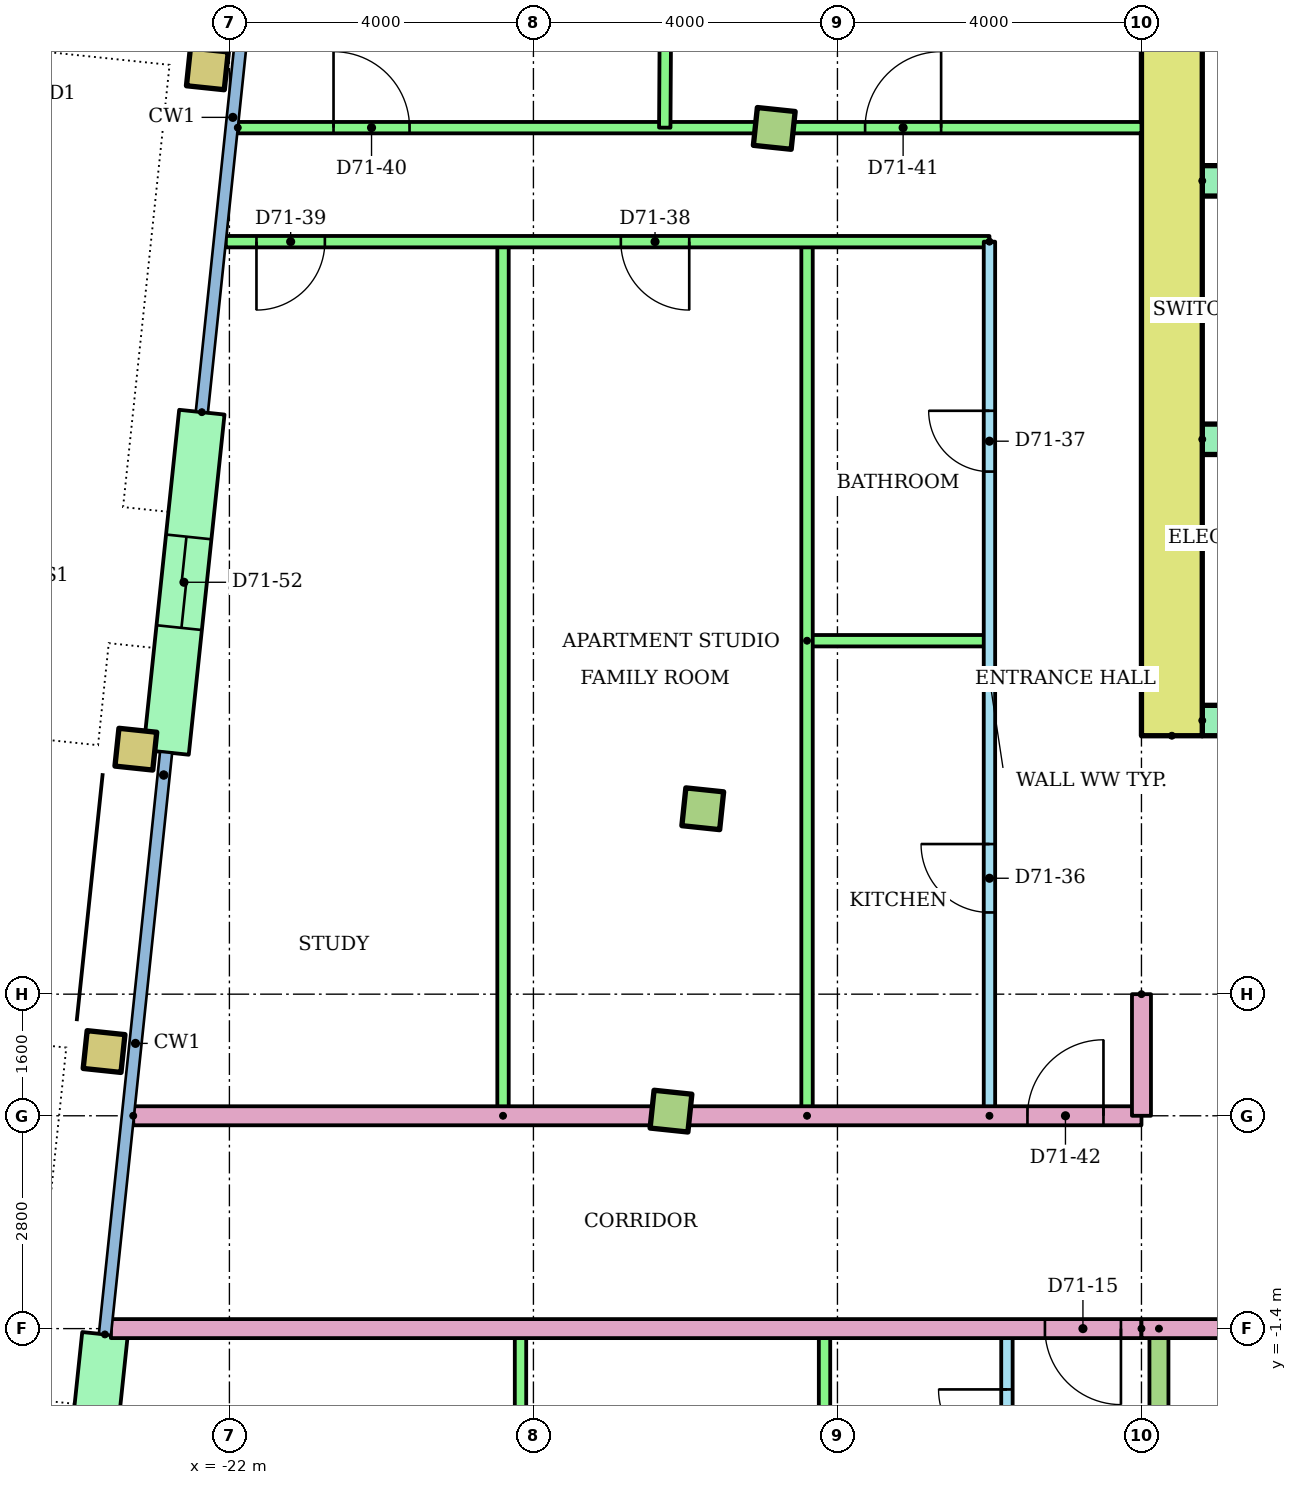
"""IFC4 building model, lengths in metres.
Left out: names, types, materials, properties, quantities, classifications, styles, units other than length and angle.
Written with IfcOpenShell. Run it as: python <this file> out.ifc"""

import sys

from ifc_helpers import new_model, si_unit, direction, frame, frame_2d, origin, origin_2d, place, context, subcontext, project, spatial, rectangle, hollow_rectangle, extrude, element, fill, save


model = new_model("IFC4")
c1 = context("Model", 3, precision=1e-05, world=origin(), true_north=direction((0.0, 1.0)))
c2 = subcontext(c1, "Body", "Model", "MODEL_VIEW")
j1 = project(units=[si_unit("LENGTHUNIT", "METRE"), si_unit("PLANEANGLEUNIT", "RADIAN")], contexts=[c1])
p1 = place(None, origin())
s1 = spatial("IfcSite", under=j1, at=p1, CompositionType="ELEMENT")
p2 = place(p1, origin())
s2 = spatial("IfcBuilding", under=s1, at=p2, CompositionType="ELEMENT")
p3 = place(p2, frame((0.0, 0.0, 272.3)))
s3 = spatial("IfcBuildingStorey", under=s2, at=p3, CompositionType="ELEMENT", Elevation=272.3)
p4 = place(p3, frame((-23.649, 2.245, 0.0), z_axis=(0.0, 0.0, 1.0), x_axis=(0.994521895368, -0.104528463268, 0.0)))
e1 = element("IfcColumn", 1, at=p4, inside=s3, PredefinedType="COLUMN", context=c2, shape_type="SweptSolid", body=[
    extrude(hollow_rectangle(XDim=0.5, YDim=0.5, WallThickness=0.025, at=origin_2d()), origin(), (0.0, 0.0, 1.0), 3.2),
])
p5 = place(p3, frame((-16.19, 1.461, 0.0), z_axis=(0.0, 0.0, 1.0), x_axis=(0.994521895368, -0.104528463268, 0.0)))
e2 = element("IfcColumn", 2, at=p5, inside=s3, PredefinedType="COLUMN", context=c2, shape_type="SweptSolid", body=[
    extrude(rectangle(XDim=0.5, YDim=0.5, at=origin_2d()), origin(), (0.0, 0.0, 1.0), 3.2),
])
p6 = place(p3, frame((-23.231, 6.223, 0.0), z_axis=(0.0, 0.0, 1.0), x_axis=(0.994521895368, -0.104528463268, 0.0)))
e3 = element("IfcColumn", 3, at=p6, inside=s3, PredefinedType="COLUMN", context=c2, shape_type="SweptSolid", body=[
    extrude(hollow_rectangle(XDim=0.5, YDim=0.5, WallThickness=0.025, at=origin_2d()), origin(), (0.0, 0.0, 1.0), 3.2),
])
p7 = place(p3, frame((-15.772, 5.439, 0.0), z_axis=(0.0, 0.0, 1.0), x_axis=(0.994521895368, -0.104528463268, 0.0)))
e4 = element("IfcColumn", 4, at=p7, inside=s3, PredefinedType="COLUMN", context=c2, shape_type="SweptSolid", body=[
    extrude(rectangle(XDim=0.5, YDim=0.5, at=origin_2d()), origin(), (0.0, 0.0, 1.0), 3.2),
])
p8 = place(p3, frame((-22.29, 15.174, 0.0), z_axis=(0.0, 0.0, 1.0), x_axis=(0.994521895368, -0.104528463268, 0.0)))
e5 = element("IfcColumn", 5, at=p8, inside=s3, PredefinedType="COLUMN", context=c2, shape_type="SweptSolid", body=[
    extrude(hollow_rectangle(XDim=0.5, YDim=0.5, WallThickness=0.025, at=origin_2d()), origin(), (0.0, 0.0, 1.0), 3.2),
])
p9 = place(p3, frame((-14.831, 14.39, 0.0), z_axis=(0.0, 0.0, 1.0), x_axis=(0.994521895368, -0.104528463268, 0.0)))
e6 = element("IfcColumn", 6, at=p9, inside=s3, PredefinedType="COLUMN", context=c2, shape_type="SweptSolid", body=[
    extrude(rectangle(XDim=0.5, YDim=0.5, at=origin_2d()), origin(), (0.0, 0.0, 1.0), 3.2),
])
p10 = place(p3, frame((-22.363, 10.657, 0.0), z_axis=(0.0, 0.0, 1.0), x_axis=(-0.104492739125, -0.994525649478, 0.0)))
e7 = element("IfcWall", 7, at=p10, inside=s3, PredefinedType="STANDARD", context=c2, shape_type="SweptSolid", body=[
    extrude(rectangle(XDim=4.5, YDim=0.6, at=frame_2d((2.25, 0.0))), origin(), (0.0, 0.0, 1.0), 2.92),
])
p11 = place(p10, frame((1.65, 0.0, 0.0)))
e8 = element("IfcOpeningElement", 8, at=p11, cuts=e7, PredefinedType="OPENING", context=c2, shape_type="SweptSolid", body=[
    extrude(rectangle(XDim=1.2, YDim=2.1, at=frame_2d((0.6, 1.05))), frame((0.0, 0.31, 0.0), z_axis=(0.0, -1.0, 0.0), x_axis=(1.0, 0.0, 0.0)), (0.0, 0.0, 1.0), 0.62),
])
p12 = place(p3, frame((-23.638, -1.476, 0.0), z_axis=(0.0, 0.0, 1.0), x_axis=(-0.104513052986, -0.994523514933, 0.0)))
e9 = element("IfcWall", 9, at=p12, inside=s3, PredefinedType="STANDARD", context=c2, shape_type="SweptSolid", body=[
    extrude(rectangle(XDim=3.7, YDim=0.6, at=frame_2d((1.85, 0.0))), origin(), (0.0, 0.0, 1.0), 2.92),
])
p13 = place(p12, frame((1.25, 0.0, 0.0)))
e10 = element("IfcOpeningElement", 10, at=p13, cuts=e9, PredefinedType="OPENING", context=c2, shape_type="SweptSolid", body=[
    extrude(rectangle(XDim=1.2, YDim=2.1, at=frame_2d((0.6, 1.05))), frame((0.0, 0.31, 0.0), z_axis=(0.0, -1.0, 0.0), x_axis=(1.0, 0.0, 0.0)), (0.0, 0.0, 1.0), 0.62),
])
p14 = place(p3, frame((-9.6, 6.4, 0.0), z_axis=(0.0, 0.0, 1.0), x_axis=(0.0, 1.0, 0.0)))
e11 = element("IfcWall", 11, at=p14, inside=s3, PredefinedType="SHEAR", context=c2, shape_type="SweptSolid", body=[
    extrude(rectangle(XDim=13.6, YDim=0.8, at=frame_2d((6.8, 0.0))), origin(), (0.0, 0.0, 1.0), 2.92),
])
p15 = place(p3, frame((-9.2, 6.6, 0.0)))
e12 = element("IfcWall", 12, at=p15, inside=s3, PredefinedType="SHEAR", context=c2, shape_type="SweptSolid", body=[
    extrude(rectangle(XDim=18.4, YDim=0.4, at=frame_2d((9.2, 0.0))), origin(), (0.0, 0.0, 1.0), 2.92),
])
p16 = place(p15, frame((8.3, 0.0, 0.0)))
e13 = element("IfcOpeningElement", 13, at=p16, cuts=e12, PredefinedType="OPENING", context=c2, shape_type="SweptSolid", body=[
    extrude(rectangle(XDim=1.8, YDim=2.1, at=frame_2d((0.9, 1.05))), frame((0.0, 0.21, 0.0), z_axis=(0.0, -1.0, 0.0), x_axis=(1.0, 0.0, 0.0)), (0.0, 0.0, 1.0), 0.42),
])
p17 = place(p15, frame((3.8, 0.0, 0.0)))
e14 = element("IfcOpeningElement", 14, at=p17, cuts=e12, PredefinedType="OPENING", context=c2, shape_type="SweptSolid", body=[
    extrude(rectangle(XDim=1.8, YDim=2.1, at=frame_2d((0.9, 1.05))), frame((0.0, 0.21, 0.0), z_axis=(0.0, -1.0, 0.0), x_axis=(1.0, 0.0, 0.0)), (0.0, 0.0, 1.0), 0.42),
])
p18 = place(p15, frame((12.8, 0.0, 0.0)))
e15 = element("IfcOpeningElement", 15, at=p18, cuts=e12, PredefinedType="OPENING", context=c2, shape_type="SweptSolid", body=[
    extrude(rectangle(XDim=1.8, YDim=2.1, at=frame_2d((0.9, 1.05))), frame((0.0, 0.21, 0.0), z_axis=(0.0, -1.0, 0.0), x_axis=(1.0, 0.0, 0.0)), (0.0, 0.0, 1.0), 0.42),
])
p19 = place(p3, frame((-9.2, 10.3, 0.0)))
e16 = element("IfcWall", 16, at=p19, inside=s3, PredefinedType="SHEAR", context=c2, shape_type="SweptSolid", body=[
    extrude(rectangle(XDim=8.0, YDim=0.4, at=frame_2d((4.0, 0.0))), origin(), (0.0, 0.0, 1.0), 2.92),
])
p20 = place(p19, frame((3.35, 0.0, 0.0)))
e17 = element("IfcOpeningElement", 17, at=p20, cuts=e16, PredefinedType="OPENING", context=c2, shape_type="SweptSolid", body=[
    extrude(rectangle(XDim=1.1, YDim=2.1, at=frame_2d((0.55, 1.05))), frame((0.0, 0.21, 0.0), z_axis=(0.0, -1.0, 0.0), x_axis=(1.0, 0.0, 0.0)), (0.0, 0.0, 1.0), 0.42),
])
p21 = place(p19, frame((6.083, 0.0, 0.0)))
e18 = element("IfcOpeningElement", 18, at=p21, cuts=e16, PredefinedType="OPENING", context=c2, shape_type="SweptSolid", body=[
    extrude(rectangle(XDim=1.1, YDim=2.1, at=frame_2d((0.55, 1.05))), frame((0.0, 0.21, 0.0), z_axis=(0.0, -1.0, 0.0), x_axis=(1.0, 0.0, 0.0)), (0.0, 0.0, 1.0), 0.42),
])
p22 = place(p19, frame((0.917, 0.0, 0.0)))
e19 = element("IfcOpeningElement", 19, at=p22, cuts=e16, PredefinedType="OPENING", context=c2, shape_type="SweptSolid", body=[
    extrude(rectangle(XDim=1.0, YDim=2.1, at=frame_2d((0.5, 1.05))), frame((0.0, 0.21, 0.0), z_axis=(0.0, -1.0, 0.0), x_axis=(1.0, 0.0, 0.0)), (0.0, 0.0, 1.0), 0.42),
])
p23 = place(p3, frame((-9.2, 13.7, 0.0)))
e20 = element("IfcWall", 20, at=p23, inside=s3, PredefinedType="SHEAR", context=c2, shape_type="SweptSolid", body=[
    extrude(rectangle(XDim=8.0, YDim=0.4, at=frame_2d((4.0, 0.0))), origin(), (0.0, 0.0, 1.0), 2.92),
])
p24 = place(p3, frame((-11.77, -5.9, 0.0), z_axis=(0.0, 0.0, 1.0), x_axis=(0.0, 1.0, 0.0)))
e21 = element("IfcWall", 21, at=p24, inside=s3, PredefinedType="PARTITIONING", context=c2, shape_type="SweptSolid", body=[
    extrude(rectangle(XDim=4.5, YDim=0.15, at=frame_2d((2.25, 0.0))), origin(), (0.0, 0.0, 1.0), 2.4),
])
p25 = place(p24, frame((2.8, 0.0, 0.0)))
e22 = element("IfcOpeningElement", 22, at=p25, cuts=e21, PredefinedType="OPENING", context=c2, shape_type="SweptSolid", body=[
    extrude(rectangle(XDim=0.9, YDim=2.1, at=frame_2d((0.45, 1.05))), frame((0.0, 0.085, 0.0), z_axis=(0.0, -1.0, 0.0), x_axis=(1.0, 0.0, 0.0)), (0.0, 0.0, 1.0), 0.17),
])
p26 = place(p24, frame((0.6, 0.0, 0.0)))
e23 = element("IfcOpeningElement", 23, at=p26, cuts=e21, PredefinedType="OPENING", context=c2, shape_type="SweptSolid", body=[
    extrude(rectangle(XDim=0.8, YDim=2.1, at=frame_2d((0.4, 1.05))), frame((0.0, 0.085, 0.0), z_axis=(0.0, -1.0, 0.0), x_axis=(1.0, 0.0, 0.0)), (0.0, 0.0, 1.0), 0.17),
])
for number, where, z_axis, x_axis in (
    (24, (-14.17, -5.9, 0.0), (0.0, 0.0, 1.0), (0.0, 1.0, 0.0)),
    (25, (-18.17, -5.9, 0.0), (0.0, 0.0, 1.0), (0.0, 1.0, 0.0)),
):
    element("IfcWall", number, at=place(p3, frame(where, z_axis=z_axis, x_axis=x_axis)), inside=s3, PredefinedType="PARTITIONING", context=c2, shape_type="SweptSolid", body=[
        extrude(rectangle(XDim=4.5, YDim=0.15, at=frame_2d((2.25, 0.0))), origin(), (0.0, 0.0, 1.0), 2.4),
    ])
p27 = place(p3, frame((-9.77, -1.4, 0.0), z_axis=(0.0, 0.0, 1.0), x_axis=(0.0, -1.0, 0.0)))
e26 = element("IfcWall", 26, at=p27, inside=s3, PredefinedType="PARTITIONING", context=c2, shape_type="SweptSolid", body=[
    extrude(rectangle(XDim=12.504, YDim=0.25, at=frame_2d((6.252, 0.0))), origin(), (0.0, 0.0, 1.0), 2.4),
])
p28 = place(p3, frame((-10.0, -1.4, 0.0), z_axis=(0.0, 0.0, 1.0), x_axis=(-1.0, 0.0, 0.0)))
e27 = element("IfcWall", 27, at=p28, inside=s3, PredefinedType="PARTITIONING", context=c2, shape_type="SweptSolid", body=[
    extrude(rectangle(XDim=13.56, YDim=0.25, at=frame_2d((6.78, 0.0))), origin(), (0.0, 0.0, 1.0), 2.4),
])
p29 = place(p28, frame((0.27, 0.0, 0.0)))
e28 = element("IfcOpeningElement", 28, at=p29, cuts=e27, PredefinedType="OPENING", context=c2, shape_type="SweptSolid", body=[
    extrude(rectangle(XDim=1.0, YDim=2.1, at=frame_2d((0.5, 1.05))), frame((0.0, 0.135, 0.0), z_axis=(0.0, -1.0, 0.0), x_axis=(1.0, 0.0, 0.0)), (0.0, 0.0, 1.0), 0.27),
])
p30 = place(p3, frame((-12.0, 1.4, 0.0), z_axis=(0.0, 0.0, 1.0), x_axis=(0.0, 1.0, 0.0)))
e29 = element("IfcWall", 29, at=p30, inside=s3, PredefinedType="PARTITIONING", context=c2, shape_type="SweptSolid", body=[
    extrude(rectangle(XDim=11.5, YDim=0.15, at=frame_2d((5.75, 0.0))), origin(), (0.0, 0.0, 1.0), 2.4),
])
p31 = place(p30, frame((2.675, 0.0, 0.0)))
e30 = element("IfcOpeningElement", 30, at=p31, cuts=e29, PredefinedType="OPENING", context=c2, shape_type="SweptSolid", body=[
    extrude(rectangle(XDim=0.9, YDim=2.1, at=frame_2d((0.45, 1.05))), frame((0.0, 0.085, 0.0), z_axis=(0.0, -1.0, 0.0), x_axis=(1.0, 0.0, 0.0)), (0.0, 0.0, 1.0), 0.17),
])
p32 = place(p30, frame((8.475, 0.0, 0.0)))
e31 = element("IfcOpeningElement", 31, at=p32, cuts=e29, PredefinedType="OPENING", context=c2, shape_type="SweptSolid", body=[
    extrude(rectangle(XDim=0.8, YDim=2.1, at=frame_2d((0.4, 1.05))), frame((0.0, 0.085, 0.0), z_axis=(0.0, -1.0, 0.0), x_axis=(1.0, 0.0, 0.0)), (0.0, 0.0, 1.0), 0.17),
])
p33 = place(p3, frame((-14.4, 7.65, 0.0)))
e32 = element("IfcWall", 32, at=p33, inside=s3, PredefinedType="PARTITIONING", context=c2, shape_type="SweptSolid", body=[
    extrude(rectangle(XDim=2.4, YDim=0.15, at=frame_2d((1.2, 0.0))), origin(), (0.0, 0.0, 1.0), 2.4),
])
for number, where, z_axis, x_axis in (
    (33, (-14.4, 1.4, 0.0), (0.0, 0.0, 1.0), (0.0, 1.0, 0.0)),
    (34, (-18.4, 1.4, 0.0), (0.0, 0.0, 1.0), (0.0, 1.0, 0.0)),
):
    element("IfcWall", number, at=place(p3, frame(where, z_axis=z_axis, x_axis=x_axis)), inside=s3, PredefinedType="PARTITIONING", context=c2, shape_type="SweptSolid", body=[
        extrude(rectangle(XDim=11.5, YDim=0.15, at=frame_2d((5.75, 0.0))), origin(), (0.0, 0.0, 1.0), 2.4),
    ])
p34 = place(p3, frame((-12.0, 12.9, 0.0), z_axis=(0.0, 0.0, 1.0), x_axis=(-1.0, 0.0, 0.0)))
e35 = element("IfcWall", 35, at=p34, inside=s3, PredefinedType="PARTITIONING", context=c2, shape_type="SweptSolid", body=[
    extrude(rectangle(XDim=10.047, YDim=0.15, at=frame_2d((5.024, 0.0))), origin(), (0.0, 0.0, 1.0), 2.4),
])
p35 = place(p34, frame((3.95, 0.0, 0.0)))
e36 = element("IfcOpeningElement", 36, at=p35, cuts=e35, PredefinedType="OPENING", context=c2, shape_type="SweptSolid", body=[
    extrude(rectangle(XDim=0.9, YDim=2.1, at=frame_2d((0.45, 1.05))), frame((0.0, 0.085, 0.0), z_axis=(0.0, -1.0, 0.0), x_axis=(1.0, 0.0, 0.0)), (0.0, 0.0, 1.0), 0.17),
])
p36 = place(p34, frame((8.744, 0.0, 0.0)))
e37 = element("IfcOpeningElement", 37, at=p36, cuts=e35, PredefinedType="OPENING", context=c2, shape_type="SweptSolid", body=[
    extrude(rectangle(XDim=0.9, YDim=2.1, at=frame_2d((0.45, 1.05))), frame((0.0, 0.085, 0.0), z_axis=(0.0, -1.0, 0.0), x_axis=(1.0, 0.0, 0.0)), (0.0, 0.0, 1.0), 0.17),
])
p37 = place(p3, frame((-21.89, 14.4, 0.0)))
e38 = element("IfcWall", 38, at=p37, inside=s3, PredefinedType="PARTITIONING", context=c2, shape_type="SweptSolid", body=[
    extrude(rectangle(XDim=11.89, YDim=0.15, at=frame_2d((5.945, 0.0))), origin(), (0.0, 0.0, 1.0), 2.4),
])
p38 = place(p37, frame((1.26, 0.0, 0.0)))
e39 = element("IfcOpeningElement", 39, at=p38, cuts=e38, PredefinedType="OPENING", context=c2, shape_type="SweptSolid", body=[
    extrude(rectangle(XDim=1.0, YDim=2.1, at=frame_2d((0.5, 1.05))), frame((0.0, 0.085, 0.0), z_axis=(0.0, -1.0, 0.0), x_axis=(1.0, 0.0, 0.0)), (0.0, 0.0, 1.0), 0.17),
])
p39 = place(p37, frame((8.254, 0.0, 0.0)))
e40 = element("IfcOpeningElement", 40, at=p39, cuts=e38, PredefinedType="OPENING", context=c2, shape_type="SweptSolid", body=[
    extrude(rectangle(XDim=1.0, YDim=2.1, at=frame_2d((0.5, 1.05))), frame((0.0, 0.085, 0.0), z_axis=(0.0, -1.0, 0.0), x_axis=(1.0, 0.0, 0.0)), (0.0, 0.0, 1.0), 0.17),
])
p40 = place(p3, frame((-16.222, 22.61, 0.0), z_axis=(0.0, 0.0, 1.0), x_axis=(-0.006095634594, -0.999981421447, 0.0)))
e41 = element("IfcWall", 41, at=p40, inside=s3, PredefinedType="PARTITIONING", context=c2, shape_type="SweptSolid", body=[
    extrude(rectangle(XDim=8.211, YDim=0.15, at=frame_2d((4.105, 0.0))), origin(), (0.0, 0.0, 1.0), 2.4),
])
p41 = place(p3, frame((-23.265, 1.4, 0.0)))
e42 = element("IfcWall", 42, at=p41, inside=s3, PredefinedType="PARTITIONING", context=c2, shape_type="SweptSolid", body=[
    extrude(rectangle(XDim=13.265, YDim=0.25, at=frame_2d((6.633, 0.0))), origin(), (0.0, 0.0, 1.0), 2.4),
])
p42 = place(p41, frame((11.765, 0.0, 0.0)))
e43 = element("IfcOpeningElement", 43, at=p42, cuts=e42, PredefinedType="OPENING", context=c2, shape_type="SweptSolid", body=[
    extrude(rectangle(XDim=1.0, YDim=2.1, at=frame_2d((0.5, 1.05))), frame((0.0, 0.135, 0.0), z_axis=(0.0, -1.0, 0.0), x_axis=(1.0, 0.0, 0.0)), (0.0, 0.0, 1.0), 0.27),
])
p43 = place(p3, frame((10.0, -1.4, 0.0), z_axis=(0.0, 0.0, 1.0), x_axis=(-1.0, 0.0, 0.0)))
e44 = element("IfcWall", 44, at=p43, inside=s3, PredefinedType="PARTITIONING", context=c2, shape_type="SweptSolid", body=[
    extrude(rectangle(XDim=20.0, YDim=0.25, at=frame_2d((10.0, 0.0))), origin(), (0.0, 0.0, 1.0), 2.4),
])
p44 = place(p43, frame((4.358, 0.0, 0.0)))
e45 = element("IfcOpeningElement", 45, at=p44, cuts=e44, PredefinedType="OPENING", context=c2, shape_type="SweptSolid", body=[
    extrude(rectangle(XDim=1.0, YDim=2.1, at=frame_2d((0.5, 1.05))), frame((0.0, 0.135, 0.0), z_axis=(0.0, -1.0, 0.0), x_axis=(1.0, 0.0, 0.0)), (0.0, 0.0, 1.0), 0.27),
])
p45 = place(p43, frame((2.614, 0.0, 0.0)))
e46 = element("IfcOpeningElement", 46, at=p45, cuts=e44, PredefinedType="OPENING", context=c2, shape_type="SweptSolid", body=[
    extrude(rectangle(XDim=0.9, YDim=2.1, at=frame_2d((0.45, 1.05))), frame((0.0, 0.135, 0.0), z_axis=(0.0, -1.0, 0.0), x_axis=(1.0, 0.0, 0.0)), (0.0, 0.0, 1.0), 0.27),
])
p46 = place(p3, frame((-10.0, 3.0, 0.0), z_axis=(0.0, 0.0, 1.0), x_axis=(0.0, -1.0, 0.0)))
e47 = element("IfcWall", 47, at=p46, inside=s3, PredefinedType="PARTITIONING", context=c2, shape_type="SweptSolid", body=[
    extrude(rectangle(XDim=1.6, YDim=0.25, at=frame_2d((0.8, 0.0))), origin(), (0.0, 0.0, 1.0), 2.4),
])
p47 = place(p25, origin())
e48 = element("IfcDoor", 48, at=p47, inside=s3, OperationType="SINGLE_SWING_RIGHT", PredefinedType="DOOR", context=c2, shape_type="SweptSolid", body=[
    extrude(rectangle(XDim=0.9, YDim=2.1, at=frame_2d((0.45, 1.05))), frame((0.0, 0.025, 0.0), z_axis=(0.0, -1.0, 0.0), x_axis=(1.0, 0.0, 0.0)), (0.0, 0.0, 1.0), 0.05),
])
fill(e22, e48)
p48 = place(p29, origin())
e49 = element("IfcDoor", 49, at=p48, inside=s3, OperationType="SINGLE_SWING_LEFT", PredefinedType="DOOR", context=c2, shape_type="SweptSolid", body=[
    extrude(rectangle(XDim=1.0, YDim=2.1, at=frame_2d((0.5, 1.05))), frame((0.0, 0.025, 0.0), z_axis=(0.0, -1.0, 0.0), x_axis=(1.0, 0.0, 0.0)), (0.0, 0.0, 1.0), 0.05),
])
fill(e28, e49)
p49 = place(p31, origin())
e50 = element("IfcDoor", 50, at=p49, inside=s3, OperationType="SINGLE_SWING_RIGHT", PredefinedType="DOOR", context=c2, shape_type="SweptSolid", body=[
    extrude(rectangle(XDim=0.9, YDim=2.1, at=frame_2d((0.45, 1.05))), frame((0.0, 0.025, 0.0), z_axis=(0.0, -1.0, 0.0), x_axis=(1.0, 0.0, 0.0)), (0.0, 0.0, 1.0), 0.05),
])
fill(e30, e50)
p50 = place(p32, origin())
e51 = element("IfcDoor", 51, at=p50, inside=s3, OperationType="SINGLE_SWING_RIGHT", PredefinedType="DOOR", context=c2, shape_type="SweptSolid", body=[
    extrude(rectangle(XDim=0.8, YDim=2.1, at=frame_2d((0.4, 1.05))), frame((0.0, 0.025, 0.0), z_axis=(0.0, -1.0, 0.0), x_axis=(1.0, 0.0, 0.0)), (0.0, 0.0, 1.0), 0.05),
])
fill(e31, e51)
p51 = place(p35, origin())
e52 = element("IfcDoor", 52, at=p51, inside=s3, OperationType="SINGLE_SWING_LEFT", PredefinedType="DOOR", context=c2, shape_type="SweptSolid", body=[
    extrude(rectangle(XDim=0.9, YDim=2.1, at=frame_2d((0.45, 1.05))), frame((0.0, 0.025, 0.0), z_axis=(0.0, -1.0, 0.0), x_axis=(1.0, 0.0, 0.0)), (0.0, 0.0, 1.0), 0.05),
])
fill(e36, e52)
p52 = place(p36, origin())
e53 = element("IfcDoor", 53, at=p52, inside=s3, OperationType="SINGLE_SWING_RIGHT", PredefinedType="DOOR", context=c2, shape_type="SweptSolid", body=[
    extrude(rectangle(XDim=0.9, YDim=2.1, at=frame_2d((0.45, 1.05))), frame((0.0, 0.025, 0.0), z_axis=(0.0, -1.0, 0.0), x_axis=(1.0, 0.0, 0.0)), (0.0, 0.0, 1.0), 0.05),
])
fill(e37, e53)
p53 = place(p38, origin())
e54 = element("IfcDoor", 54, at=p53, inside=s3, OperationType="SINGLE_SWING_LEFT", PredefinedType="DOOR", context=c2, shape_type="SweptSolid", body=[
    extrude(rectangle(XDim=1.0, YDim=2.1, at=frame_2d((0.5, 1.05))), frame((0.0, 0.025, 0.0), z_axis=(0.0, -1.0, 0.0), x_axis=(1.0, 0.0, 0.0)), (0.0, 0.0, 1.0), 0.05),
])
fill(e39, e54)
p54 = place(p39, origin())
e55 = element("IfcDoor", 55, at=p54, inside=s3, OperationType="SINGLE_SWING_RIGHT", PredefinedType="DOOR", context=c2, shape_type="SweptSolid", body=[
    extrude(rectangle(XDim=1.0, YDim=2.1, at=frame_2d((0.5, 1.05))), frame((0.0, 0.025, 0.0), z_axis=(0.0, -1.0, 0.0), x_axis=(1.0, 0.0, 0.0)), (0.0, 0.0, 1.0), 0.05),
])
fill(e40, e55)
p55 = place(p42, origin())
e56 = element("IfcDoor", 56, at=p55, inside=s3, OperationType="SINGLE_SWING_RIGHT", PredefinedType="DOOR", context=c2, shape_type="SweptSolid", body=[
    extrude(rectangle(XDim=1.0, YDim=2.1, at=frame_2d((0.5, 1.05))), frame((0.0, 0.025, 0.0), z_axis=(0.0, -1.0, 0.0), x_axis=(1.0, 0.0, 0.0)), (0.0, 0.0, 1.0), 0.05),
])
fill(e43, e56)
p56 = place(p11, origin())
e57 = element("IfcDoor", 57, at=p56, inside=s3, OperationType="SLIDING_TO_LEFT", PredefinedType="DOOR", context=c2, shape_type="SweptSolid", body=[
    extrude(rectangle(XDim=1.2, YDim=2.1, at=frame_2d((0.6, 1.05))), frame((0.0, 0.025, 0.0), z_axis=(0.0, -1.0, 0.0), x_axis=(1.0, 0.0, 0.0)), (0.0, 0.0, 1.0), 0.05),
])
fill(e8, e57)
save(model, sys.argv[1])
